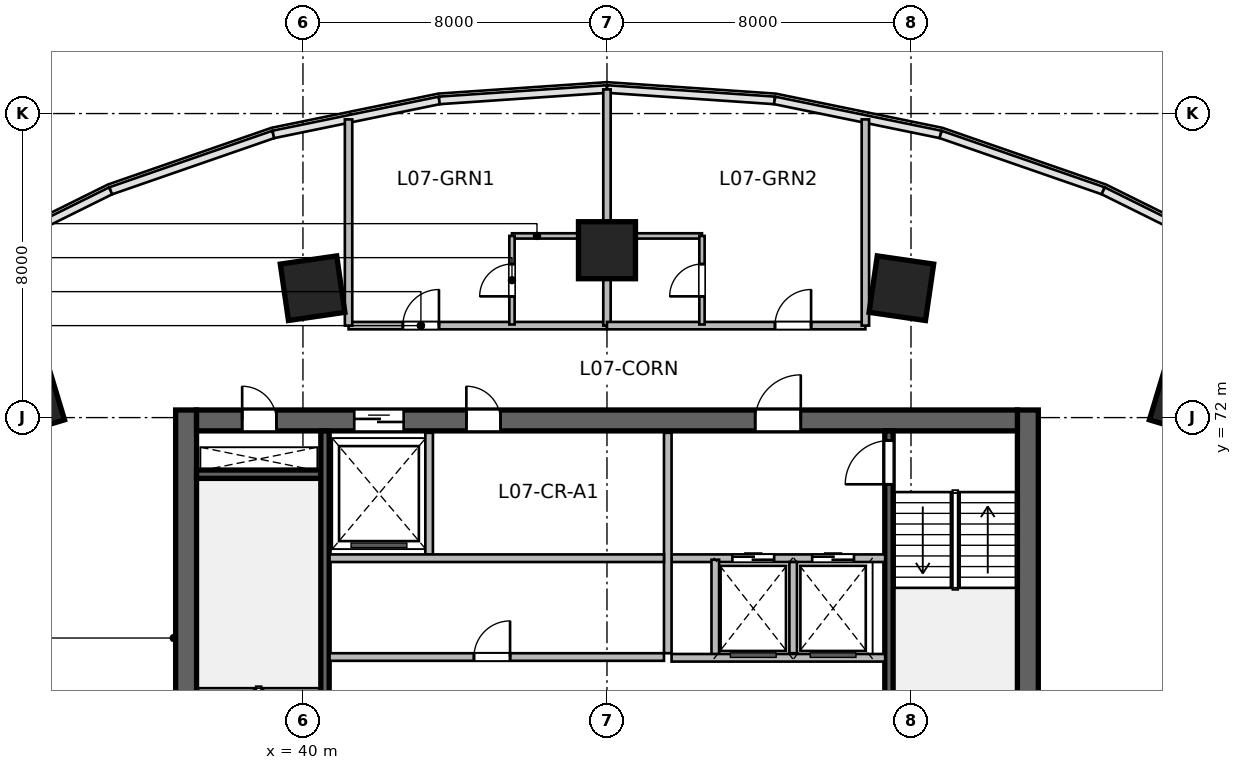
"""IFC4 building model, lengths in metres.
Left out: names, types, materials, properties, quantities, classifications, styles, units other than length and angle.
Written with IfcOpenShell. Run it as: python <this file> out.ifc"""

import sys

from ifc_helpers import new_model, si_unit, direction, frame, frame_2d, origin, origin_2d, place, context, subcontext, project, spatial, rectangle, extrude, source, transform, mapped, element, fill, save


model = new_model("IFC4")
c1 = context("Model", 3, precision=1e-05, world=origin(), true_north=direction((0.0, 1.0)))
c2 = subcontext(c1, "Body", "Model", "MODEL_VIEW")
j1 = project(units=[si_unit("LENGTHUNIT", "METRE"), si_unit("PLANEANGLEUNIT", "RADIAN")], contexts=[c1])
p1 = place(None, origin())
s1 = spatial("IfcSite", under=j1, at=p1, CompositionType="ELEMENT")
p2 = place(p1, origin())
s2 = spatial("IfcBuilding", under=s1, at=p2, CompositionType="ELEMENT")
p3 = place(p2, frame((0.0, 0.0, 39.0)))
s3 = spatial("IfcBuildingStorey", under=s2, at=p3, CompositionType="ELEMENT", Elevation=39.0)
m1 = source(origin(), c2, "Body", "SweptSolid", [
    extrude(rectangle(XDim=12.0, YDim=0.55, at=frame_2d((6.0, 0.0))), origin(), (0.0, 0.0, 1.0), 3.6),
])
for number, where, z_axis, x_axis in (
    (1, (36.925, 60.2, 0.0), (0.0, 0.0, 1.0), (0.0, 1.0, 0.0)),
    (2, (59.075, 60.2, 0.0), (0.0, 0.0, 1.0), (0.0, 1.0, 0.0)),
):
    element("IfcWall", number, at=place(p3, frame(where, z_axis=z_axis, x_axis=x_axis)), inside=s3, PredefinedType="SHEAR", context=c2, shape_type="MappedRepresentation", body=[
        mapped(m1, transform((0.0, 0.0, 0.0), scale=1.0)),
    ])
m2 = source(origin(), c2, "Body", "SweptSolid", [
    extrude(rectangle(XDim=21.6, YDim=0.55, at=frame_2d((10.8, 0.0))), origin(), (0.0, 0.0, 1.0), 3.6),
])
p4 = place(p3, frame((37.2, 71.925, 0.0), z_axis=(0.0, 0.0, 1.0), x_axis=(1.0, 0.0, 0.0)))
e3 = element("IfcWall", 3, at=p4, inside=s3, PredefinedType="SHEAR", context=c2, shape_type="MappedRepresentation", body=[
    mapped(m2, transform((0.0, 0.0, 0.0), scale=1.0)),
])
p5 = place(p4, frame((1.2, 0.0, 0.0)))
e4 = element("IfcOpeningElement", 4, at=p5, cuts=e3, PredefinedType="OPENING", context=c2, shape_type="SweptSolid", body=[
    extrude(rectangle(XDim=0.9, YDim=2.1, at=frame_2d((0.45, 1.05))), frame((0.0, 0.285, 0.0), z_axis=(0.0, -1.0, 0.0), x_axis=(1.0, 0.0, 0.0)), (0.0, 0.0, 1.0), 0.57),
])
p6 = place(p4, frame((14.7, 0.0, 0.0)))
e5 = element("IfcOpeningElement", 5, at=p6, cuts=e3, PredefinedType="OPENING", context=c2, shape_type="SweptSolid", body=[
    extrude(rectangle(XDim=1.2, YDim=2.15, at=frame_2d((0.6, 1.075))), frame((0.0, 0.285, 0.0), z_axis=(0.0, -1.0, 0.0), x_axis=(1.0, 0.0, 0.0)), (0.0, 0.0, 1.0), 0.57),
])
p7 = place(p4, frame((4.15, 0.0, 0.0)))
e6 = element("IfcOpeningElement", 6, at=p7, cuts=e3, PredefinedType="OPENING", context=c2, shape_type="SweptSolid", body=[
    extrude(rectangle(XDim=1.3, YDim=2.15, at=frame_2d((0.65, 1.075))), frame((0.0, 0.285, 0.0), z_axis=(0.0, -1.0, 0.0), x_axis=(1.0, 0.0, 0.0)), (0.0, 0.0, 1.0), 0.57),
])
p8 = place(p4, frame((7.1, 0.0, 0.0)))
e7 = element("IfcOpeningElement", 7, at=p8, cuts=e3, PredefinedType="OPENING", context=c2, shape_type="SweptSolid", body=[
    extrude(rectangle(XDim=0.9, YDim=2.1, at=frame_2d((0.45, 1.05))), frame((0.0, 0.285, 0.0), z_axis=(0.0, -1.0, 0.0), x_axis=(1.0, 0.0, 0.0)), (0.0, 0.0, 1.0), 0.57),
])
m3 = source(origin(), c2, "Body", "SweptSolid", [
    extrude(rectangle(XDim=3.27, YDim=0.22, at=frame_2d((1.635, 0.0))), origin(), (0.0, 0.0, 1.0), 3.6),
])
p9 = place(p3, frame((37.2, 70.51, 0.0), z_axis=(0.0, 0.0, 1.0), x_axis=(1.0, 0.0, 0.0)))
e8 = element("IfcWall", 8, at=p9, inside=s3, PredefinedType="SHEAR", context=c2, shape_type="MappedRepresentation", body=[
    mapped(m3, transform((0.0, 0.0, 0.0), scale=1.0)),
])
m4 = source(origin(), c2, "Body", "SweptSolid", [
    extrude(rectangle(XDim=10.9, YDim=0.22, at=frame_2d((5.45, 0.0))), origin(), (0.0, 0.0, 1.0), 3.6),
])
p10 = place(p3, frame((40.58, 60.75, 0.0), z_axis=(0.0, 0.0, 1.0), x_axis=(0.0, 1.0, 0.0)))
e9 = element("IfcWall", 9, at=p10, inside=s3, PredefinedType="SHEAR", context=c2, shape_type="MappedRepresentation", body=[
    mapped(m4, transform((0.0, 0.0, 0.0), scale=1.0)),
])
p11 = place(p3, frame((55.42, 60.75, 0.0), z_axis=(0.0, 0.0, 1.0), x_axis=(0.0, 1.0, 0.0)))
e10 = element("IfcWall", 10, at=p11, inside=s3, PredefinedType="SHEAR", context=c2, shape_type="MappedRepresentation", body=[
    mapped(m4, transform((0.0, 0.0, 0.0), scale=1.0)),
])
p12 = place(p11, frame((9.495, 0.0, 0.0)))
e11 = element("IfcOpeningElement", 11, at=p12, cuts=e10, PredefinedType="OPENING", context=c2, shape_type="SweptSolid", body=[
    extrude(rectangle(XDim=1.15, YDim=2.15, at=frame_2d((0.575, 1.075))), frame((0.0, 0.12, 0.0), z_axis=(0.0, -1.0, 0.0), x_axis=(1.0, 0.0, 0.0)), (0.0, 0.0, 1.0), 0.24),
])
m5 = source(origin(), c2, "Body", "SweptSolid", [
    extrude(rectangle(XDim=1.5, YDim=1.5, at=origin_2d()), origin(), (0.0, 0.0, 1.0), 3.6),
])
for number, where, z_axis, x_axis in (
    (12, (32.791, 72.442, 0.0), (0.0, 0.0, 1.0), (-0.289, 0.957, 0.0)),
    (13, (40.253, 75.404, 0.0), (0.0, 0.0, 1.0), (-0.143, 0.99, 0.0)),
    (14, (48.0, 76.404, 0.0), (0.0, 0.0, 1.0), (0.0, 1.0, 0.0)),
    (15, (55.747, 75.404, 0.0), (0.0, 0.0, 1.0), (0.143, 0.99, 0.0)),
    (16, (63.209, 72.442, 0.0), (0.0, 0.0, 1.0), (0.289, 0.957, 0.0)),
):
    element("IfcColumn", number, at=place(p3, frame(where, z_axis=z_axis, x_axis=x_axis)), inside=s3, PredefinedType="COLUMN", context=c2, shape_type="MappedRepresentation", body=[
        mapped(m5, transform((0.0, 0.0, 0.0), scale=1.0)),
    ])
m6 = source(origin(), c2, "Body", "SweptSolid", [
    extrude(rectangle(XDim=5.62, YDim=0.2, at=frame_2d((2.81, 0.0))), origin(), (0.0, 0.0, 1.0), 3.36),
])
p13 = place(p3, frame((49.7, 68.3, 0.0), z_axis=(0.0, 0.0, 1.0), x_axis=(1.0, 0.0, 0.0)))
e17 = element("IfcWall", 17, at=p13, inside=s3, PredefinedType="SOLIDWALL", context=c2, shape_type="MappedRepresentation", body=[
    mapped(m6, transform((0.0, 0.0, 0.0), scale=1.0)),
])
p14 = place(p13, frame((1.6, 0.0, 0.0)))
e18 = element("IfcOpeningElement", 18, at=p14, cuts=e17, PredefinedType="OPENING", context=c2, shape_type="SweptSolid", body=[
    extrude(rectangle(XDim=1.1, YDim=2.15, at=frame_2d((0.55, 1.075))), frame((0.0, 0.11, 0.0), z_axis=(0.0, -1.0, 0.0), x_axis=(1.0, 0.0, 0.0)), (0.0, 0.0, 1.0), 0.22),
])
p15 = place(p13, frame((3.7, 0.0, 0.0)))
e19 = element("IfcOpeningElement", 19, at=p15, cuts=e17, PredefinedType="OPENING", context=c2, shape_type="SweptSolid", body=[
    extrude(rectangle(XDim=1.1, YDim=2.15, at=frame_2d((0.55, 1.075))), frame((0.0, 0.11, 0.0), z_axis=(0.0, -1.0, 0.0), x_axis=(1.0, 0.0, 0.0)), (0.0, 0.0, 1.0), 0.22),
])
m7 = source(origin(), c2, "Body", "SweptSolid", [
    extrude(rectangle(XDim=5.8, YDim=0.2, at=frame_2d((2.9, 0.0))), origin(), (0.0, 0.0, 1.0), 3.36),
])
p16 = place(p3, frame((49.6, 65.8, 0.0), z_axis=(0.0, 0.0, 1.0), x_axis=(0.0, 1.0, 0.0)))
e20 = element("IfcWall", 20, at=p16, inside=s3, PredefinedType="SOLIDWALL", context=c2, shape_type="MappedRepresentation", body=[
    mapped(m7, transform((0.0, 0.0, 0.0), scale=1.0)),
])
m8 = source(origin(), c2, "Body", "SweptSolid", [
    extrude(rectangle(XDim=2.58, YDim=0.2, at=frame_2d((1.29, 0.0))), origin(), (0.0, 0.0, 1.0), 3.36),
])
p17 = place(p3, frame((50.85, 65.68, 0.0), z_axis=(0.0, 0.0, 1.0), x_axis=(0.0, 1.0, 0.0)))
e21 = element("IfcWall", 21, at=p17, inside=s3, PredefinedType="SOLIDWALL", context=c2, shape_type="MappedRepresentation", body=[
    mapped(m8, transform((0.0, 0.0, 0.0), scale=1.0)),
])
m9 = source(origin(), c2, "Body", "SweptSolid", [
    extrude(rectangle(XDim=2.4, YDim=0.2, at=frame_2d((1.2, 0.0))), origin(), (0.0, 0.0, 1.0), 3.36),
])
p18 = place(p3, frame((52.9, 65.8, 0.0), z_axis=(0.0, 0.0, 1.0), x_axis=(0.0, 1.0, 0.0)))
e22 = element("IfcWall", 22, at=p18, inside=s3, PredefinedType="SOLIDWALL", context=c2, shape_type="MappedRepresentation", body=[
    mapped(m9, transform((0.0, 0.0, 0.0), scale=1.0)),
])
p19 = place(p3, frame((49.7, 65.68, 0.0), z_axis=(0.0, 0.0, 1.0), x_axis=(1.0, 0.0, 0.0)))
e23 = element("IfcWall", 23, at=p19, inside=s3, PredefinedType="SOLIDWALL", context=c2, shape_type="MappedRepresentation", body=[
    mapped(m6, transform((0.0, 0.0, 0.0), scale=1.0)),
])
m10 = source(origin(), c2, "Body", "SweptSolid", [
    extrude(rectangle(XDim=3.2, YDim=0.2, at=frame_2d((1.6, 0.0))), origin(), (0.0, 0.0, 1.0), 3.36),
])
p20 = place(p3, frame((43.32, 68.4, 0.0), z_axis=(0.0, 0.0, 1.0), x_axis=(0.0, 1.0, 0.0)))
e24 = element("IfcWall", 24, at=p20, inside=s3, PredefinedType="SOLIDWALL", context=c2, shape_type="MappedRepresentation", body=[
    mapped(m10, transform((0.0, 0.0, 0.0), scale=1.0)),
])
m11 = source(origin(), c2, "Body", "SweptSolid", [
    extrude(rectangle(XDim=8.8, YDim=0.2, at=frame_2d((4.4, 0.0))), origin(), (0.0, 0.0, 1.0), 3.36),
])
p21 = place(p3, frame((40.7, 68.3, 0.0), z_axis=(0.0, 0.0, 1.0), x_axis=(1.0, 0.0, 0.0)))
e25 = element("IfcWall", 25, at=p21, inside=s3, PredefinedType="SOLIDWALL", context=c2, shape_type="MappedRepresentation", body=[
    mapped(m11, transform((0.0, 0.0, 0.0), scale=1.0)),
])
p22 = place(p3, frame((40.7, 65.7, 0.0), z_axis=(0.0, 0.0, 1.0), x_axis=(1.0, 0.0, 0.0)))
e26 = element("IfcWall", 26, at=p22, inside=s3, PredefinedType="SOLIDWALL", context=c2, shape_type="MappedRepresentation", body=[
    mapped(m11, transform((0.0, 0.0, 0.0), scale=1.0)),
])
p23 = place(p22, frame((3.8, 0.0, 0.0)))
e27 = element("IfcOpeningElement", 27, at=p23, cuts=e26, PredefinedType="OPENING", context=c2, shape_type="SweptSolid", body=[
    extrude(rectangle(XDim=0.95, YDim=2.15, at=frame_2d((0.475, 1.075))), frame((0.0, 0.11, 0.0), z_axis=(0.0, -1.0, 0.0), x_axis=(1.0, 0.0, 0.0)), (0.0, 0.0, 1.0), 0.22),
])
m12 = source(origin(), c2, "Body", "SweptSolid", [
    extrude(rectangle(XDim=6.8, YDim=0.195, at=frame_2d((3.4, 0.0))), origin(), (0.0, 0.0, 1.0), 3.36),
])
p24 = place(p3, frame((41.2, 74.42, 0.0), z_axis=(0.0, 0.0, 1.0), x_axis=(1.0, 0.0, 0.0)))
e28 = element("IfcWall", 28, at=p24, inside=s3, PredefinedType="PARTITIONING", context=c2, shape_type="MappedRepresentation", body=[
    mapped(m12, transform((0.0, 0.0, 0.0), scale=1.0)),
])
p25 = place(p24, frame((1.429, 0.0, 0.0)))
e29 = element("IfcOpeningElement", 29, at=p25, cuts=e28, PredefinedType="OPENING", context=c2, shape_type="SweptSolid", body=[
    extrude(rectangle(XDim=0.95, YDim=2.15, at=frame_2d((0.475, 1.075))), frame((0.0, 0.107, 0.0), z_axis=(0.0, -1.0, 0.0), x_axis=(1.0, 0.0, 0.0)), (0.0, 0.0, 1.0), 0.215),
])
m13 = source(origin(), c2, "Body", "SweptSolid", [
    extrude(rectangle(XDim=6.216, YDim=0.195, at=frame_2d((3.108, 0.0))), origin(), (0.0, 0.0, 1.0), 2.644),
])
p26 = place(p3, frame((48.0, 74.42, 0.0), z_axis=(0.0, 0.0, 1.0), x_axis=(0.0, 1.0, 0.0)))
e30 = element("IfcWall", 30, at=p26, inside=s3, PredefinedType="PARTITIONING", context=c2, shape_type="MappedRepresentation", body=[
    mapped(m13, transform((0.0, 0.0, 0.0), scale=1.0)),
])
m14 = source(origin(), c2, "Body", "SweptSolid", [
    extrude(rectangle(XDim=5.426, YDim=0.195, at=frame_2d((2.713, 0.0))), origin(), (0.0, 0.0, 1.0), 3.36),
])
p27 = place(p3, frame((41.2, 74.42, 0.0), z_axis=(0.0, 0.0, 1.0), x_axis=(0.0, 1.0, 0.0)))
e31 = element("IfcWall", 31, at=p27, inside=s3, PredefinedType="PARTITIONING", context=c2, shape_type="MappedRepresentation", body=[
    mapped(m14, transform((0.0, 0.0, 0.0), scale=1.0)),
])
m15 = source(origin(), c2, "Body", "SweptSolid", [
    extrude(rectangle(XDim=2.35, YDim=0.14, at=frame_2d((1.175, 0.0))), origin(), (0.0, 0.0, 1.0), 3.36),
])
p28 = place(p3, frame((45.5, 76.78, 0.0), z_axis=(0.0, 0.0, 1.0), x_axis=(1.0, 0.0, 0.0)))
e32 = element("IfcWall", 32, at=p28, inside=s3, PredefinedType="PARTITIONING", context=c2, shape_type="MappedRepresentation", body=[
    mapped(m15, transform((0.0, 0.0, 0.0), scale=1.0)),
])
m16 = source(origin(), c2, "Body", "SweptSolid", [
    extrude(rectangle(XDim=2.33, YDim=0.14, at=frame_2d((1.165, 0.0))), origin(), (0.0, 0.0, 1.0), 3.36),
])
p29 = place(p3, frame((45.5, 74.45, 0.0), z_axis=(0.0, 0.0, 1.0), x_axis=(0.0, 1.0, 0.0)))
e33 = element("IfcWall", 33, at=p29, inside=s3, PredefinedType="PARTITIONING", context=c2, shape_type="MappedRepresentation", body=[
    mapped(m16, transform((0.0, 0.0, 0.0), scale=1.0)),
])
p30 = place(p29, frame((0.74, 0.0, 0.0)))
e34 = element("IfcOpeningElement", 34, at=p30, cuts=e33, PredefinedType="OPENING", context=c2, shape_type="SweptSolid", body=[
    extrude(rectangle(XDim=0.85, YDim=2.05, at=frame_2d((0.425, 1.025))), frame((0.0, 0.08, 0.0), z_axis=(0.0, -1.0, 0.0), x_axis=(1.0, 0.0, 0.0)), (0.0, 0.0, 1.0), 0.16),
])
p31 = place(p3, frame((48.0, 74.42, 0.0), z_axis=(0.0, 0.0, 1.0), x_axis=(1.0, 0.0, 0.0)))
e35 = element("IfcWall", 35, at=p31, inside=s3, PredefinedType="PARTITIONING", context=c2, shape_type="MappedRepresentation", body=[
    mapped(m12, transform((0.0, 0.0, 0.0), scale=1.0)),
])
p32 = place(p31, frame((4.421, 0.0, 0.0)))
e36 = element("IfcOpeningElement", 36, at=p32, cuts=e35, PredefinedType="OPENING", context=c2, shape_type="SweptSolid", body=[
    extrude(rectangle(XDim=0.95, YDim=2.15, at=frame_2d((0.475, 1.075))), frame((0.0, 0.107, 0.0), z_axis=(0.0, -1.0, 0.0), x_axis=(1.0, 0.0, 0.0)), (0.0, 0.0, 1.0), 0.215),
])
p33 = place(p3, frame((54.8, 74.42, 0.0), z_axis=(0.0, 0.0, 1.0), x_axis=(0.0, 1.0, 0.0)))
e37 = element("IfcWall", 37, at=p33, inside=s3, PredefinedType="PARTITIONING", context=c2, shape_type="MappedRepresentation", body=[
    mapped(m14, transform((0.0, 0.0, 0.0), scale=1.0)),
])
p34 = place(p3, frame((48.15, 76.78, 0.0), z_axis=(0.0, 0.0, 1.0), x_axis=(1.0, 0.0, 0.0)))
e38 = element("IfcWall", 38, at=p34, inside=s3, PredefinedType="PARTITIONING", context=c2, shape_type="MappedRepresentation", body=[
    mapped(m15, transform((0.0, 0.0, 0.0), scale=1.0)),
])
p35 = place(p3, frame((50.5, 74.45, 0.0), z_axis=(0.0, 0.0, 1.0), x_axis=(0.0, 1.0, 0.0)))
e39 = element("IfcWall", 39, at=p35, inside=s3, PredefinedType="PARTITIONING", context=c2, shape_type="MappedRepresentation", body=[
    mapped(m16, transform((0.0, 0.0, 0.0), scale=1.0)),
])
p36 = place(p35, frame((0.74, 0.0, 0.0)))
e40 = element("IfcOpeningElement", 40, at=p36, cuts=e39, PredefinedType="OPENING", context=c2, shape_type="SweptSolid", body=[
    extrude(rectangle(XDim=0.85, YDim=2.05, at=frame_2d((0.425, 1.025))), frame((0.0, 0.08, 0.0), z_axis=(0.0, -1.0, 0.0), x_axis=(1.0, 0.0, 0.0)), (0.0, 0.0, 1.0), 0.16),
])
m17 = source(origin(), c2, "Body", "SweptSolid", [
    extrude(rectangle(XDim=0.9, YDim=2.1, at=frame_2d((0.45, 1.05))), frame((0.0, 0.025, 0.0), z_axis=(0.0, -1.0, 0.0), x_axis=(1.0, 0.0, 0.0)), (0.0, 0.0, 1.0), 0.05),
])
p37 = place(p5, origin())
e41 = element("IfcDoor", 41, at=p37, inside=s3, OperationType="SINGLE_SWING_LEFT", PredefinedType="DOOR", context=c2, shape_type="MappedRepresentation", body=[
    mapped(m17, transform((0.0, 0.0, 0.0), scale=1.0)),
])
fill(e4, e41)
m18 = source(origin(), c2, "Body", "SweptSolid", [
    extrude(rectangle(XDim=1.15, YDim=2.15, at=frame_2d((0.575, 1.075))), frame((0.0, 0.025, 0.0), z_axis=(0.0, -1.0, 0.0), x_axis=(1.0, 0.0, 0.0)), (0.0, 0.0, 1.0), 0.05),
])
p38 = place(p12, origin())
e42 = element("IfcDoor", 42, at=p38, inside=s3, OperationType="SINGLE_SWING_LEFT", PredefinedType="DOOR", context=c2, shape_type="MappedRepresentation", body=[
    mapped(m18, transform((0.0, 0.0, 0.0), scale=1.0)),
])
fill(e11, e42)
m19 = source(origin(), c2, "Body", "SweptSolid", [
    extrude(rectangle(XDim=1.2, YDim=2.15, at=frame_2d((0.6, 1.075))), frame((0.0, 0.025, 0.0), z_axis=(0.0, -1.0, 0.0), x_axis=(1.0, 0.0, 0.0)), (0.0, 0.0, 1.0), 0.05),
])
p39 = place(p6, origin())
e43 = element("IfcDoor", 43, at=p39, inside=s3, OperationType="SINGLE_SWING_RIGHT", PredefinedType="DOOR", context=c2, shape_type="MappedRepresentation", body=[
    mapped(m19, transform((0.0, 0.0, 0.0), scale=1.0)),
])
fill(e5, e43)
m20 = source(origin(), c2, "Body", "SweptSolid", [
    extrude(rectangle(XDim=1.1, YDim=2.15, at=frame_2d((0.55, 1.075))), frame((0.0, 0.025, 0.0), z_axis=(0.0, -1.0, 0.0), x_axis=(1.0, 0.0, 0.0)), (0.0, 0.0, 1.0), 0.05),
])
p40 = place(p14, origin())
e44 = element("IfcDoor", 44, at=p40, inside=s3, OperationType="DOUBLE_DOOR_SLIDING", PredefinedType="DOOR", context=c2, shape_type="MappedRepresentation", body=[
    mapped(m20, transform((0.0, 0.0, 0.0), scale=1.0)),
])
fill(e18, e44)
p41 = place(p15, origin())
e45 = element("IfcDoor", 45, at=p41, inside=s3, OperationType="DOUBLE_DOOR_SLIDING", PredefinedType="DOOR", context=c2, shape_type="MappedRepresentation", body=[
    mapped(m20, transform((0.0, 0.0, 0.0), scale=1.0)),
])
fill(e19, e45)
m21 = source(origin(), c2, "Body", "SweptSolid", [
    extrude(rectangle(XDim=1.3, YDim=2.15, at=frame_2d((0.65, 1.075))), frame((0.0, 0.025, 0.0), z_axis=(0.0, -1.0, 0.0), x_axis=(1.0, 0.0, 0.0)), (0.0, 0.0, 1.0), 0.05),
])
p42 = place(p7, origin())
e46 = element("IfcDoor", 46, at=p42, inside=s3, OperationType="DOUBLE_DOOR_SLIDING", PredefinedType="DOOR", context=c2, shape_type="MappedRepresentation", body=[
    mapped(m21, transform((0.0, 0.0, 0.0), scale=1.0)),
])
fill(e6, e46)
p43 = place(p8, origin())
e47 = element("IfcDoor", 47, at=p43, inside=s3, OperationType="SINGLE_SWING_LEFT", PredefinedType="DOOR", context=c2, shape_type="MappedRepresentation", body=[
    mapped(m17, transform((0.0, 0.0, 0.0), scale=1.0)),
])
fill(e7, e47)
m22 = source(origin(), c2, "Body", "SweptSolid", [
    extrude(rectangle(XDim=0.95, YDim=2.15, at=frame_2d((0.475, 1.075))), frame((0.0, 0.025, 0.0), z_axis=(0.0, -1.0, 0.0), x_axis=(1.0, 0.0, 0.0)), (0.0, 0.0, 1.0), 0.05),
])
p44 = place(p23, origin())
e48 = element("IfcDoor", 48, at=p44, inside=s3, OperationType="SINGLE_SWING_RIGHT", PredefinedType="DOOR", context=c2, shape_type="MappedRepresentation", body=[
    mapped(m22, transform((0.0, 0.0, 0.0), scale=1.0)),
])
fill(e27, e48)
p45 = place(p25, origin())
e49 = element("IfcDoor", 49, at=p45, inside=s3, OperationType="SINGLE_SWING_RIGHT", PredefinedType="DOOR", context=c2, shape_type="MappedRepresentation", body=[
    mapped(m22, transform((0.0, 0.0, 0.0), scale=1.0)),
])
fill(e29, e49)
m23 = source(origin(), c2, "Body", "SweptSolid", [
    extrude(rectangle(XDim=0.85, YDim=2.05, at=frame_2d((0.425, 1.025))), frame((0.0, 0.025, 0.0), z_axis=(0.0, -1.0, 0.0), x_axis=(1.0, 0.0, 0.0)), (0.0, 0.0, 1.0), 0.05),
])
p46 = place(p30, origin())
e50 = element("IfcDoor", 50, at=p46, inside=s3, OperationType="SINGLE_SWING_LEFT", PredefinedType="DOOR", context=c2, shape_type="MappedRepresentation", body=[
    mapped(m23, transform((0.0, 0.0, 0.0), scale=1.0)),
])
fill(e34, e50)
p47 = place(p32, origin())
e51 = element("IfcDoor", 51, at=p47, inside=s3, OperationType="SINGLE_SWING_RIGHT", PredefinedType="DOOR", context=c2, shape_type="MappedRepresentation", body=[
    mapped(m22, transform((0.0, 0.0, 0.0), scale=1.0)),
])
fill(e36, e51)
p48 = place(p36, origin())
e52 = element("IfcDoor", 52, at=p48, inside=s3, OperationType="SINGLE_SWING_LEFT", PredefinedType="DOOR", context=c2, shape_type="MappedRepresentation", body=[
    mapped(m23, transform((0.0, 0.0, 0.0), scale=1.0)),
])
fill(e40, e52)
save(model, sys.argv[1])
